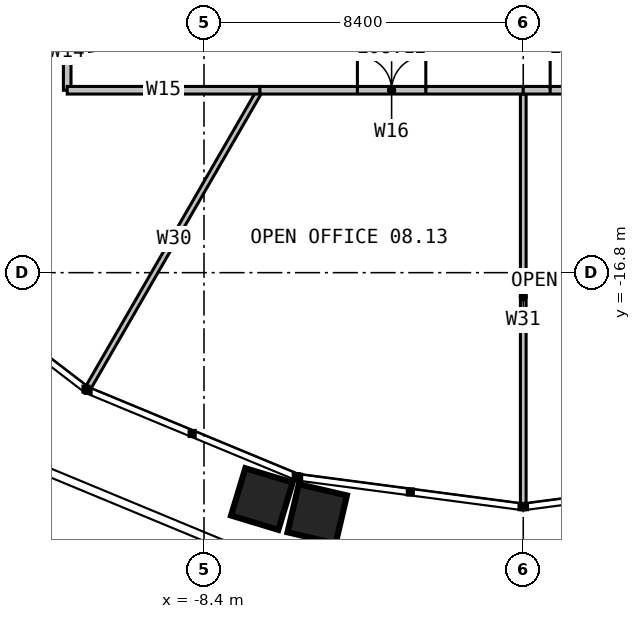
"""IFC4 building model, lengths in metres.
Left out: names, types, materials, properties, quantities, classifications, styles, units other than length and angle.
Written with IfcOpenShell. Run it as: python <this file> out.ifc"""

import sys

from ifc_helpers import new_model, si_unit, direction, frame, frame_2d, origin, place, context, subcontext, project, spatial, rectangle, extrude, element, fill, save


model = new_model("IFC4")
c1 = context("Model", 3, precision=1e-05, world=origin(), true_north=direction((0.0, 1.0)))
c2 = subcontext(c1, "Body", "Model", "MODEL_VIEW")
j1 = project(units=[si_unit("LENGTHUNIT", "METRE"), si_unit("PLANEANGLEUNIT", "RADIAN")], contexts=[c1])
p1 = place(None, origin())
s1 = spatial("IfcSite", under=j1, at=p1, CompositionType="ELEMENT")
p2 = place(p1, origin())
s2 = spatial("IfcBuilding", under=s1, at=p2, CompositionType="ELEMENT")
p3 = place(p2, frame((0.0, 0.0, 37.0)))
s3 = spatial("IfcBuildingStorey", under=s2, at=p3, CompositionType="ELEMENT", Elevation=37.0)
p4 = place(p3, frame((-6.928, -12.0, 0.0), z_axis=(0.0, 0.0, 1.0), x_axis=(-0.49999598783, -0.866027720199, 0.0)))
e1 = element("IfcWall", 1, at=p4, inside=s3, PredefinedType="PARTITIONING", context=c2, shape_type="SweptSolid", body=[
    extrude(rectangle(XDim=9.014, YDim=0.15, at=frame_2d((4.507, 0.0))), origin(), (0.0, 0.0, 1.0), 2.79),
])
p5 = place(p3, frame((0.0, -12.0, 0.0), z_axis=(0.0, 0.0, 1.0), x_axis=(0.0, -1.0, 0.0)))
e2 = element("IfcWall", 2, at=p5, inside=s3, PredefinedType="PARTITIONING", context=c2, shape_type="SweptSolid", body=[
    extrude(rectangle(XDim=10.87, YDim=0.15, at=frame_2d((5.435, 0.0))), origin(), (0.0, 0.0, 1.0), 2.79),
])
p6 = place(p3, frame((-12.0, -10.0, 0.0), z_axis=(0.0, 0.0, 1.0), x_axis=(0.0, -1.0, 0.0)))
e3 = element("IfcWall", 3, at=p6, inside=s3, PredefinedType="PARTITIONING", context=c2, shape_type="SweptSolid", body=[
    extrude(rectangle(XDim=2.0, YDim=0.2, at=frame_2d((1.0, 0.0))), origin(), (0.0, 0.0, 1.0), 3.8),
])
p7 = place(p3, frame((-12.0, -12.0, 0.0), z_axis=(0.0, 0.0, 1.0), x_axis=(1.0, 0.0, 0.0)))
e4 = element("IfcWall", 4, at=p7, inside=s3, PredefinedType="PARTITIONING", context=c2, shape_type="SweptSolid", body=[
    extrude(rectangle(XDim=5.072, YDim=0.2, at=frame_2d((2.536, 0.0))), origin(), (0.0, 0.0, 1.0), 3.8),
])
p8 = place(p3, frame((-6.928, -12.0, 0.0), z_axis=(0.0, 0.0, 1.0), x_axis=(1.0, 0.0, 0.0)))
e5 = element("IfcWall", 5, at=p8, inside=s3, PredefinedType="PARTITIONING", context=c2, shape_type="SweptSolid", body=[
    extrude(rectangle(XDim=6.928, YDim=0.2, at=frame_2d((3.464, 0.0))), origin(), (0.0, 0.0, 1.0), 3.8),
])
p9 = place(p8, frame((2.564, 0.0, 0.0)))
e6 = element("IfcOpeningElement", 6, at=p9, cuts=e5, PredefinedType="OPENING", context=c2, shape_type="SweptSolid", body=[
    extrude(rectangle(XDim=1.8, YDim=2.2, at=frame_2d((0.9, 1.1))), frame((0.0, 0.11, 0.0), z_axis=(0.0, -1.0, 0.0), x_axis=(1.0, 0.0, 0.0)), (0.0, 0.0, 1.0), 0.22),
])
p10 = place(p3, frame((0.0, -12.0, 0.0), z_axis=(0.0, 0.0, 1.0), x_axis=(1.0, 0.0, 0.0)))
e7 = element("IfcWall", 7, at=p10, inside=s3, PredefinedType="PARTITIONING", context=c2, shape_type="SweptSolid", body=[
    extrude(rectangle(XDim=3.215, YDim=0.2, at=frame_2d((1.608, 0.0))), origin(), (0.0, 0.0, 1.0), 3.8),
])
p11 = place(p10, frame((0.708, 0.0, 0.0)))
e8 = element("IfcOpeningElement", 8, at=p11, cuts=e7, PredefinedType="OPENING", context=c2, shape_type="SweptSolid", body=[
    extrude(rectangle(XDim=1.8, YDim=2.2, at=frame_2d((0.9, 1.1))), frame((0.0, 0.11, 0.0), z_axis=(0.0, -1.0, 0.0), x_axis=(1.0, 0.0, 0.0)), (0.0, 0.0, 1.0), 0.22),
])
p12 = place(p9, origin())
e9 = element("IfcDoor", 9, at=p12, inside=s3, OperationType="DOUBLE_DOOR_SINGLE_SWING", PredefinedType="DOOR", context=c2, shape_type="SweptSolid", body=[
    extrude(rectangle(XDim=1.8, YDim=2.2, at=frame_2d((0.9, 1.1))), frame((0.0, 0.025, 0.0), z_axis=(0.0, -1.0, 0.0), x_axis=(1.0, 0.0, 0.0)), (0.0, 0.0, 1.0), 0.05),
])
fill(e6, e9)
p13 = place(p11, origin())
e10 = element("IfcDoor", 10, at=p13, inside=s3, OperationType="DOUBLE_DOOR_SINGLE_SWING", PredefinedType="DOOR", context=c2, shape_type="SweptSolid", body=[
    extrude(rectangle(XDim=1.8, YDim=2.2, at=frame_2d((0.9, 1.1))), frame((0.0, 0.025, 0.0), z_axis=(0.0, -1.0, 0.0), x_axis=(1.0, 0.0, 0.0)), (0.0, 0.0, 1.0), 0.05),
])
fill(e8, e10)
save(model, sys.argv[1])
